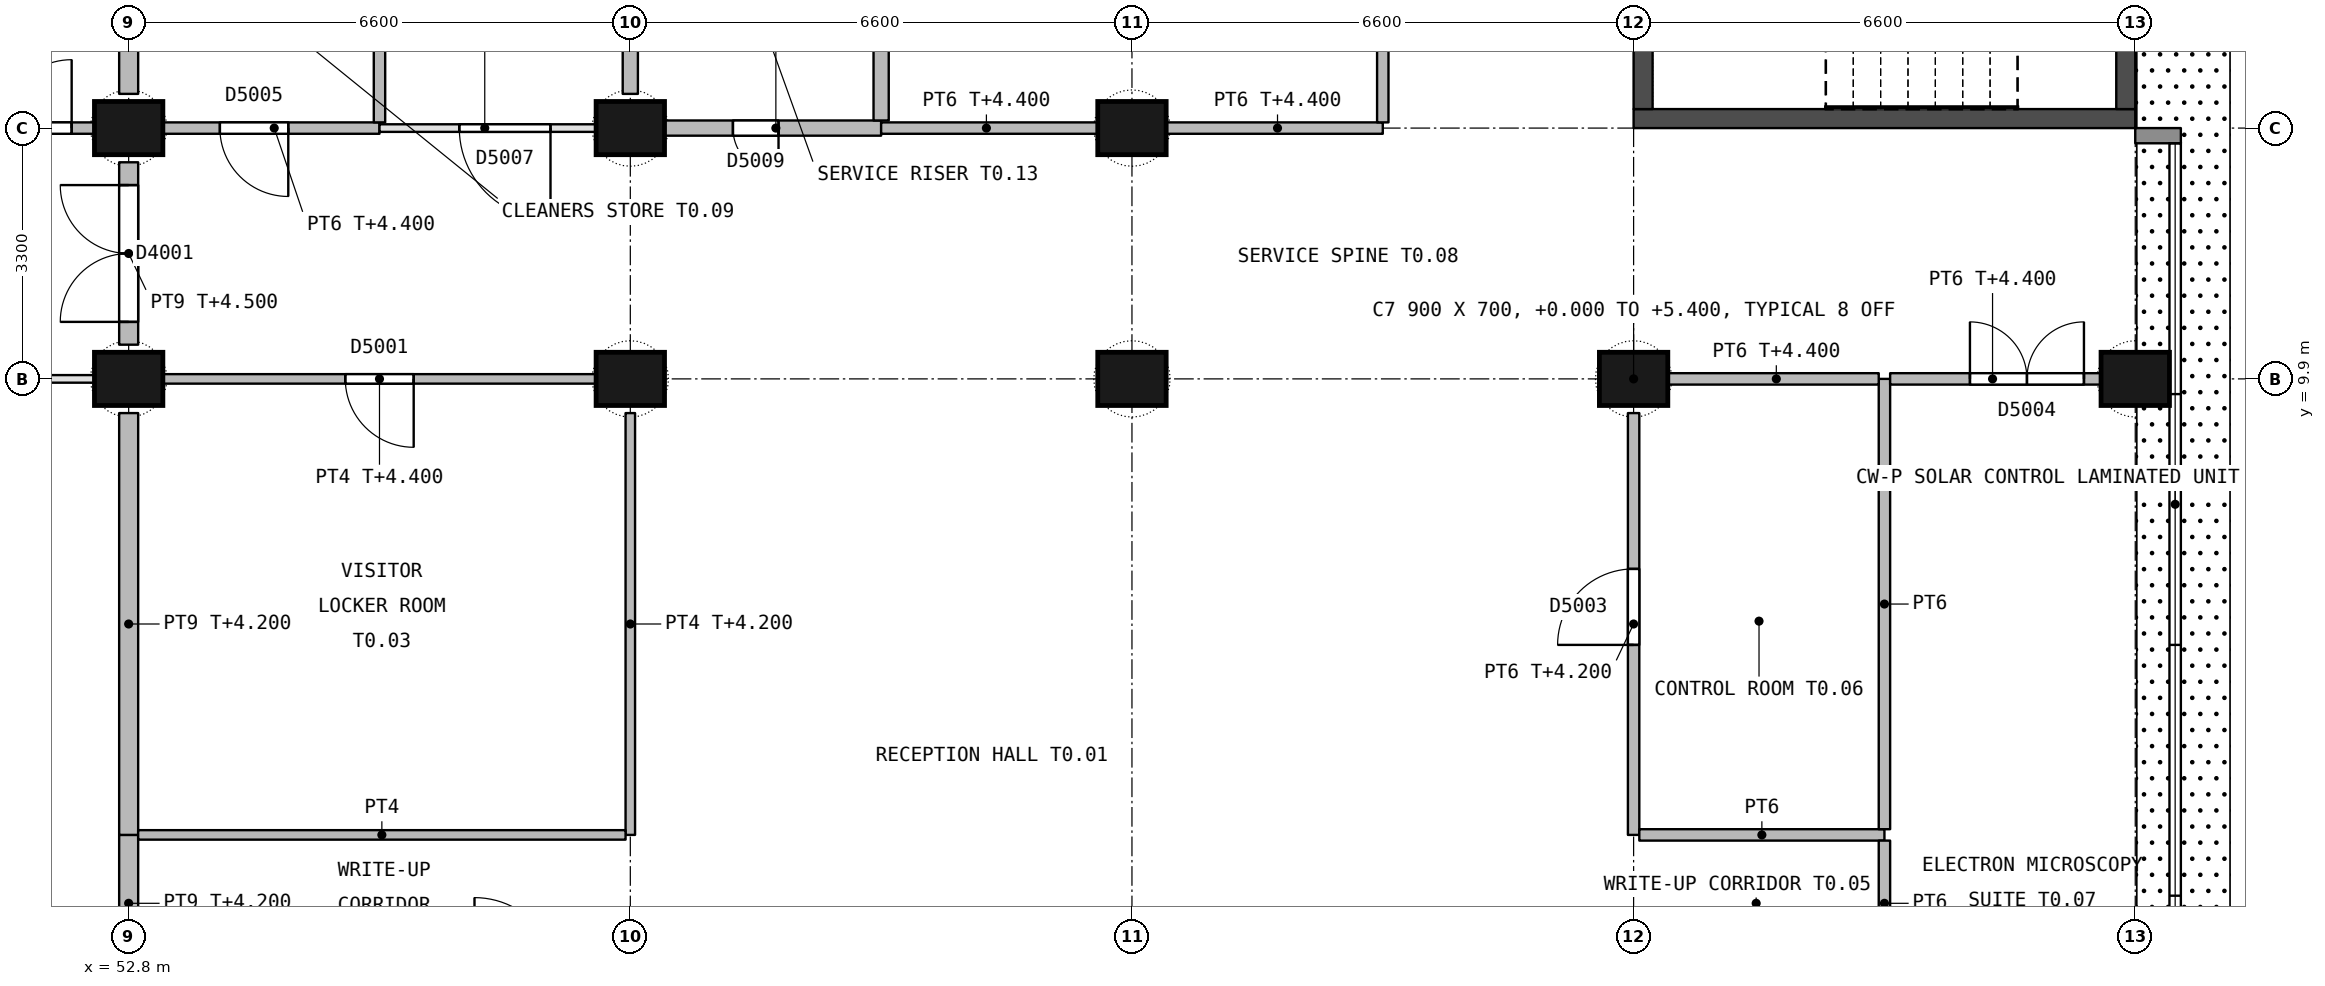
"""IFC4 building model, lengths in metres.
Left out: names, types, materials, properties, quantities, classifications, styles, units other than length and angle.
Written with IfcOpenShell. Run it as: python <this file> out.ifc"""

import sys

from ifc_helpers import new_model, si_unit, direction, frame, frame_2d, origin, origin_2d, place, context, subcontext, project, spatial, rectangle, extrude, element, fill, save


model = new_model("IFC4")
c1 = context("Model", 3, precision=1e-05, world=origin(), true_north=direction((0.0, 1.0)))
c2 = subcontext(c1, "Body", "Model", "MODEL_VIEW")
j1 = project(units=[si_unit("LENGTHUNIT", "METRE"), si_unit("PLANEANGLEUNIT", "RADIAN")], contexts=[c1])
p1 = place(None, origin())
s1 = spatial("IfcSite", under=j1, at=p1, CompositionType="ELEMENT")
p2 = place(p1, origin())
s2 = spatial("IfcBuilding", under=s1, at=p2, CompositionType="ELEMENT")
p3 = place(p2, origin())
s3 = spatial("IfcBuildingStorey", under=s2, at=p3, CompositionType="ELEMENT", Elevation=0.0)
for number, where, z_axis, x_axis in (
    (1, (52.8, 9.9, 0.0), (0.0, 0.0, 1.0), (1.0, 0.0, 0.0)),
    (2, (52.8, 13.2, 0.0), (0.0, 0.0, 1.0), (1.0, 0.0, 0.0)),
    (3, (59.4, 9.9, 0.0), (0.0, 0.0, 1.0), (1.0, 0.0, 0.0)),
    (4, (59.4, 13.2, 0.0), (0.0, 0.0, 1.0), (1.0, 0.0, 0.0)),
    (5, (66.0, 9.9, 0.0), (0.0, 0.0, 1.0), (1.0, 0.0, 0.0)),
    (6, (66.0, 13.2, 0.0), (0.0, 0.0, 1.0), (1.0, 0.0, 0.0)),
    (7, (72.6, 9.9, 0.0), (0.0, 0.0, 1.0), (1.0, 0.0, 0.0)),
    (8, (79.2, 9.9, 0.0), (0.0, 0.0, 1.0), (1.0, 0.0, 0.0)),
):
    element("IfcColumn", number, at=place(p3, frame(where, z_axis=z_axis, x_axis=x_axis)), inside=s3, PredefinedType="COLUMN", context=c2, shape_type="SweptSolid", body=[
        extrude(rectangle(XDim=0.9, YDim=0.7, at=origin_2d()), origin(), (0.0, 0.0, 1.0), 5.4),
    ])
p4 = place(p3, frame((72.6, 13.325, 0.0), z_axis=(0.0, 0.0, 1.0), x_axis=(1.0, 0.0, 0.0)))
e9 = element("IfcWall", 9, at=p4, inside=s3, PredefinedType="SHEAR", context=c2, shape_type="SweptSolid", body=[
    extrude(rectangle(XDim=6.6, YDim=0.25, at=frame_2d((3.3, 0.0))), origin(), (0.0, 0.0, 1.0), 5.1),
])
p5 = place(p3, frame((72.725, 13.45, 0.0), z_axis=(0.0, 0.0, 1.0), x_axis=(0.0, 1.0, 0.0)))
e10 = element("IfcWall", 10, at=p5, inside=s3, PredefinedType="SHEAR", context=c2, shape_type="SweptSolid", body=[
    extrude(rectangle(XDim=9.4, YDim=0.25, at=frame_2d((4.7, 0.0))), origin(), (0.0, 0.0, 1.0), 5.1),
])
p6 = place(p5, frame((4.125, 0.0, 0.0)))
e11 = element("IfcOpeningElement", 11, at=p6, cuts=e10, PredefinedType="OPENING", context=c2, shape_type="SweptSolid", body=[
    extrude(rectangle(XDim=1.2, YDim=2.1, at=frame_2d((0.6, 1.05))), frame((0.0, 0.135, 0.0), z_axis=(0.0, -1.0, 0.0), x_axis=(1.0, 0.0, 0.0)), (0.0, 0.0, 1.0), 0.27),
])
p7 = place(p3, frame((79.075, 13.45, 0.0), z_axis=(0.0, 0.0, 1.0), x_axis=(0.0, 1.0, 0.0)))
e12 = element("IfcWall", 12, at=p7, inside=s3, PredefinedType="SHEAR", context=c2, shape_type="SweptSolid", body=[
    extrude(rectangle(XDim=9.4, YDim=0.25, at=frame_2d((4.7, 0.0))), origin(), (0.0, 0.0, 1.0), 5.1),
])
p8 = place(p7, frame((4.125, 0.0, 0.0)))
e13 = element("IfcOpeningElement", 13, at=p8, cuts=e12, PredefinedType="OPENING", context=c2, shape_type="SweptSolid", body=[
    extrude(rectangle(XDim=1.2, YDim=2.4, at=frame_2d((0.6, 1.2))), frame((0.0, 0.135, 0.0), z_axis=(0.0, -1.0, 0.0), x_axis=(1.0, 0.0, 0.0)), (0.0, 0.0, 1.0), 0.27),
])
p9 = place(p7, frame((0.825, 0.0, 0.0)))
e14 = element("IfcOpeningElement", 14, at=p9, cuts=e12, PredefinedType="OPENING", context=c2, shape_type="SweptSolid", body=[
    extrude(rectangle(XDim=1.1, YDim=2.4, at=frame_2d((0.55, 1.2))), frame((0.0, 0.135, 0.0), z_axis=(0.0, -1.0, 0.0), x_axis=(1.0, 0.0, 0.0)), (0.0, 0.0, 1.0), 0.27),
])
p10 = place(p3, frame((79.2, 13.1, 0.0), z_axis=(0.0, 0.0, 1.0), x_axis=(1.0, 0.0, 0.0)))
e15 = element("IfcWall", 15, at=p10, inside=s3, PredefinedType="STANDARD", context=c2, shape_type="SweptSolid", body=[
    extrude(rectangle(XDim=0.6, YDim=0.2, at=frame_2d((0.3, 0.0))), origin(), (0.0, 0.0, 1.0), 4.4),
])
p11 = place(p3, frame((49.5, 13.2, 0.0), z_axis=(0.0, 0.0, 1.0), x_axis=(1.0, 0.0, 0.0)))
e16 = element("IfcWall", 16, at=p11, inside=s3, PredefinedType="PARTITIONING", context=c2, shape_type="SweptSolid", body=[
    extrude(rectangle(XDim=2.85, YDim=0.15, at=frame_2d((1.425, 0.0))), origin(), (0.0, 0.0, 1.0), 4.4),
])
p12 = place(p11, frame((0.75, 0.0, 0.0)))
e17 = element("IfcOpeningElement", 17, at=p12, cuts=e16, PredefinedType="OPENING", context=c2, shape_type="SweptSolid", body=[
    extrude(rectangle(XDim=1.8, YDim=2.4, at=frame_2d((0.9, 1.2))), frame((0.0, 0.085, 0.0), z_axis=(0.0, -1.0, 0.0), x_axis=(1.0, 0.0, 0.0)), (0.0, 0.0, 1.0), 0.17),
])
p13 = place(p3, frame((46.6, 9.9, 0.0), z_axis=(0.0, 0.0, 1.0), x_axis=(1.0, 0.0, 0.0)))
e18 = element("IfcWall", 18, at=p13, inside=s3, PredefinedType="PARTITIONING", context=c2, shape_type="SweptSolid", body=[
    extrude(rectangle(XDim=5.75, YDim=0.1, at=frame_2d((2.875, 0.0))), origin(), (0.0, 0.0, 1.0), 4.4),
])
p14 = place(p13, frame((0.5, 0.0, 0.0)))
e19 = element("IfcOpeningElement", 19, at=p14, cuts=e18, PredefinedType="OPENING", context=c2, shape_type="SweptSolid", body=[
    extrude(rectangle(XDim=1.5, YDim=2.4, at=frame_2d((0.75, 1.2))), frame((0.0, 0.06, 0.0), z_axis=(0.0, -1.0, 0.0), x_axis=(1.0, 0.0, 0.0)), (0.0, 0.0, 1.0), 0.12),
])
p15 = place(p3, frame((52.8, 10.35, 0.0), z_axis=(0.0, 0.0, 1.0), x_axis=(0.0, 1.0, 0.0)))
e20 = element("IfcWall", 20, at=p15, inside=s3, PredefinedType="PARTITIONING", context=c2, shape_type="SweptSolid", body=[
    extrude(rectangle(XDim=2.4, YDim=0.25, at=frame_2d((1.2, 0.0))), origin(), (0.0, 0.0, 1.0), 4.5),
])
p16 = place(p15, frame((0.3, 0.0, 0.0)))
e21 = element("IfcOpeningElement", 21, at=p16, cuts=e20, PredefinedType="OPENING", context=c2, shape_type="SweptSolid", body=[
    extrude(rectangle(XDim=1.8, YDim=2.1, at=frame_2d((0.9, 1.05))), frame((0.0, 0.135, 0.0), z_axis=(0.0, -1.0, 0.0), x_axis=(1.0, 0.0, 0.0)), (0.0, 0.0, 1.0), 0.27),
])
p17 = place(p3, frame((52.8, 13.65, 0.0), z_axis=(0.0, 0.0, 1.0), x_axis=(0.0, 1.0, 0.0)))
e22 = element("IfcWall", 22, at=p17, inside=s3, PredefinedType="PARTITIONING", context=c2, shape_type="SweptSolid", body=[
    extrude(rectangle(XDim=2.85, YDim=0.25, at=frame_2d((1.425, 0.0))), origin(), (0.0, 0.0, 1.0), 4.2),
])
p18 = place(p3, frame((52.8, 2.1, 0.0), z_axis=(0.0, 0.0, 1.0), x_axis=(0.0, 1.0, 0.0)))
e23 = element("IfcWall", 23, at=p18, inside=s3, PredefinedType="PARTITIONING", context=c2, shape_type="SweptSolid", body=[
    extrude(rectangle(XDim=1.8, YDim=0.25, at=frame_2d((0.9, 0.0))), origin(), (0.0, 0.0, 1.0), 4.2),
])
p19 = place(p3, frame((52.8, 3.9, 0.0), z_axis=(0.0, 0.0, 1.0), x_axis=(0.0, 1.0, 0.0)))
e24 = element("IfcWall", 24, at=p19, inside=s3, PredefinedType="PARTITIONING", context=c2, shape_type="SweptSolid", body=[
    extrude(rectangle(XDim=5.55, YDim=0.25, at=frame_2d((2.775, 0.0))), origin(), (0.0, 0.0, 1.0), 4.2),
])
p20 = place(p3, frame((59.4, 9.45, 0.0), z_axis=(0.0, 0.0, 1.0), x_axis=(0.0, -1.0, 0.0)))
e25 = element("IfcWall", 25, at=p20, inside=s3, PredefinedType="PARTITIONING", context=c2, shape_type="SweptSolid", body=[
    extrude(rectangle(XDim=5.55, YDim=0.125, at=frame_2d((2.775, 0.0))), origin(), (0.0, 0.0, 1.0), 4.2),
])
p21 = place(p3, frame((72.6, 9.45, 0.0), z_axis=(0.0, 0.0, 1.0), x_axis=(0.0, -1.0, 0.0)))
e26 = element("IfcWall", 26, at=p21, inside=s3, PredefinedType="PARTITIONING", context=c2, shape_type="SweptSolid", body=[
    extrude(rectangle(XDim=5.55, YDim=0.15, at=frame_2d((2.775, 0.0))), origin(), (0.0, 0.0, 1.0), 4.2),
])
p22 = place(p21, frame((2.05, 0.0, 0.0)))
e27 = element("IfcOpeningElement", 27, at=p22, cuts=e26, PredefinedType="OPENING", context=c2, shape_type="SweptSolid", body=[
    extrude(rectangle(XDim=1.0, YDim=2.1, at=frame_2d((0.5, 1.05))), frame((0.0, 0.085, 0.0), z_axis=(0.0, -1.0, 0.0), x_axis=(1.0, 0.0, 0.0)), (0.0, 0.0, 1.0), 0.17),
])
p23 = place(p3, frame((59.337, 3.9, 0.0), z_axis=(0.0, 0.0, 1.0), x_axis=(-1.0, 0.0, 0.0)))
e28 = element("IfcWall", 28, at=p23, inside=s3, PredefinedType="PARTITIONING", context=c2, shape_type="SweptSolid", body=[
    extrude(rectangle(XDim=6.412, YDim=0.125, at=frame_2d((3.206, 0.0))), origin(), (0.0, 0.0, 1.0), 5.1),
])
p24 = place(p3, frame((58.95, 9.9, 0.0), z_axis=(0.0, 0.0, 1.0), x_axis=(-1.0, 0.0, 0.0)))
e29 = element("IfcWall", 29, at=p24, inside=s3, PredefinedType="PARTITIONING", context=c2, shape_type="SweptSolid", body=[
    extrude(rectangle(XDim=5.7, YDim=0.125, at=frame_2d((2.85, 0.0))), origin(), (0.0, 0.0, 1.0), 4.4),
])
p25 = place(p24, frame((2.4, 0.0, 0.0)))
e30 = element("IfcOpeningElement", 30, at=p25, cuts=e29, PredefinedType="OPENING", context=c2, shape_type="SweptSolid", body=[
    extrude(rectangle(XDim=0.9, YDim=2.1, at=frame_2d((0.45, 1.05))), frame((0.0, 0.073, 0.0), z_axis=(0.0, -1.0, 0.0), x_axis=(1.0, 0.0, 0.0)), (0.0, 0.0, 1.0), 0.145),
])
p26 = place(p3, frame((75.9, 3.9, 0.0), z_axis=(0.0, 0.0, 1.0), x_axis=(-1.0, 0.0, 0.0)))
e31 = element("IfcWall", 31, at=p26, inside=s3, PredefinedType="PARTITIONING", context=c2, shape_type="SweptSolid", body=[
    extrude(rectangle(XDim=3.225, YDim=0.15, at=frame_2d((1.612, 0.0))), origin(), (0.0, 0.0, 1.0), 5.1),
])
p27 = place(p3, frame((75.9, 2.175, 0.0), z_axis=(0.0, 0.0, 1.0), x_axis=(0.0, 1.0, 0.0)))
e32 = element("IfcWall", 32, at=p27, inside=s3, PredefinedType="PARTITIONING", context=c2, shape_type="SweptSolid", body=[
    extrude(rectangle(XDim=1.65, YDim=0.15, at=frame_2d((0.825, 0.0))), origin(), (0.0, 0.0, 1.0), 5.1),
])
p28 = place(p3, frame((75.9, 3.975, 0.0), z_axis=(0.0, 0.0, 1.0), x_axis=(0.0, 1.0, 0.0)))
e33 = element("IfcWall", 33, at=p28, inside=s3, PredefinedType="PARTITIONING", context=c2, shape_type="SweptSolid", body=[
    extrude(rectangle(XDim=5.925, YDim=0.15, at=frame_2d((2.962, 0.0))), origin(), (0.0, 0.0, 1.0), 5.1),
])
p29 = place(p3, frame((75.825, 9.9, 0.0), z_axis=(0.0, 0.0, 1.0), x_axis=(-1.0, 0.0, 0.0)))
e34 = element("IfcWall", 34, at=p29, inside=s3, PredefinedType="PARTITIONING", context=c2, shape_type="SweptSolid", body=[
    extrude(rectangle(XDim=2.775, YDim=0.15, at=frame_2d((1.387, 0.0))), origin(), (0.0, 0.0, 1.0), 4.4),
])
p30 = place(p3, frame((75.975, 9.9, 0.0), z_axis=(0.0, 0.0, 1.0), x_axis=(1.0, 0.0, 0.0)))
e35 = element("IfcWall", 35, at=p30, inside=s3, PredefinedType="PARTITIONING", context=c2, shape_type="SweptSolid", body=[
    extrude(rectangle(XDim=2.775, YDim=0.15, at=frame_2d((1.387, 0.0))), origin(), (0.0, 0.0, 1.0), 4.4),
])
p31 = place(p30, frame((1.05, 0.0, 0.0)))
e36 = element("IfcOpeningElement", 36, at=p31, cuts=e35, PredefinedType="OPENING", context=c2, shape_type="SweptSolid", body=[
    extrude(rectangle(XDim=1.5, YDim=2.4, at=frame_2d((0.75, 1.2))), frame((0.0, 0.085, 0.0), z_axis=(0.0, -1.0, 0.0), x_axis=(1.0, 0.0, 0.0)), (0.0, 0.0, 1.0), 0.17),
])
p32 = place(p3, frame((56.1, 13.2, 0.0), z_axis=(0.0, 0.0, 1.0), x_axis=(-1.0, 0.0, 0.0)))
e37 = element("IfcWall", 37, at=p32, inside=s3, PredefinedType="PARTITIONING", context=c2, shape_type="SweptSolid", body=[
    extrude(rectangle(XDim=2.85, YDim=0.15, at=frame_2d((1.425, 0.0))), origin(), (0.0, 0.0, 1.0), 4.4),
])
p33 = place(p32, frame((1.2, 0.0, 0.0)))
e38 = element("IfcOpeningElement", 38, at=p33, cuts=e37, PredefinedType="OPENING", context=c2, shape_type="SweptSolid", body=[
    extrude(rectangle(XDim=0.9, YDim=2.1, at=frame_2d((0.45, 1.05))), frame((0.0, 0.085, 0.0), z_axis=(0.0, -1.0, 0.0), x_axis=(1.0, 0.0, 0.0)), (0.0, 0.0, 1.0), 0.17),
])
p34 = place(p3, frame((56.1, 13.2, 0.0), z_axis=(0.0, 0.0, 1.0), x_axis=(1.0, 0.0, 0.0)))
e39 = element("IfcWall", 39, at=p34, inside=s3, PredefinedType="PARTITIONING", context=c2, shape_type="SweptSolid", body=[
    extrude(rectangle(XDim=2.85, YDim=0.1, at=frame_2d((1.425, 0.0))), origin(), (0.0, 0.0, 1.0), 4.4),
])
p35 = place(p34, frame((1.05, 0.0, 0.0)))
e40 = element("IfcOpeningElement", 40, at=p35, cuts=e39, PredefinedType="OPENING", context=c2, shape_type="SweptSolid", body=[
    extrude(rectangle(XDim=1.2, YDim=2.1, at=frame_2d((0.6, 1.05))), frame((0.0, 0.06, 0.0), z_axis=(0.0, -1.0, 0.0), x_axis=(1.0, 0.0, 0.0)), (0.0, 0.0, 1.0), 0.12),
])
p36 = place(p3, frame((59.85, 13.2, 0.0), z_axis=(0.0, 0.0, 1.0), x_axis=(1.0, 0.0, 0.0)))
e41 = element("IfcWall", 41, at=p36, inside=s3, PredefinedType="PARTITIONING", context=c2, shape_type="SweptSolid", body=[
    extrude(rectangle(XDim=2.85, YDim=0.2, at=frame_2d((1.425, 0.0))), origin(), (0.0, 0.0, 1.0), 4.4),
])
p37 = place(p36, frame((0.9, 0.0, 0.0)))
e42 = element("IfcOpeningElement", 42, at=p37, cuts=e41, PredefinedType="OPENING", context=c2, shape_type="SweptSolid", body=[
    extrude(rectangle(XDim=0.6, YDim=2.1, at=frame_2d((0.3, 1.05))), frame((0.0, 0.11, 0.0), z_axis=(0.0, -1.0, 0.0), x_axis=(1.0, 0.0, 0.0)), (0.0, 0.0, 1.0), 0.22),
])
for number, where, z_axis, x_axis in (
    (43, (69.3, 13.2, 0.0), (0.0, 0.0, 1.0), (-1.0, 0.0, 0.0)),
    (44, (65.55, 13.2, 0.0), (0.0, 0.0, 1.0), (-1.0, 0.0, 0.0)),
):
    element("IfcWall", number, at=place(p3, frame(where, z_axis=z_axis, x_axis=x_axis)), inside=s3, PredefinedType="PARTITIONING", context=c2, shape_type="SweptSolid", body=[
        extrude(rectangle(XDim=2.85, YDim=0.15, at=frame_2d((1.425, 0.0))), origin(), (0.0, 0.0, 1.0), 4.4),
    ])
p38 = place(p3, frame((56.1, 13.275, 0.0), z_axis=(0.0, 0.0, 1.0), x_axis=(0.0, 1.0, 0.0)))
e45 = element("IfcWall", 45, at=p38, inside=s3, PredefinedType="PARTITIONING", context=c2, shape_type="SweptSolid", body=[
    extrude(rectangle(XDim=3.15, YDim=0.15, at=frame_2d((1.575, 0.0))), origin(), (0.0, 0.0, 1.0), 5.1),
])
p39 = place(p3, frame((59.4, 13.65, 0.0), z_axis=(0.0, 0.0, 1.0), x_axis=(0.0, 1.0, 0.0)))
e46 = element("IfcWall", 46, at=p39, inside=s3, PredefinedType="PARTITIONING", context=c2, shape_type="SweptSolid", body=[
    extrude(rectangle(XDim=2.85, YDim=0.2, at=frame_2d((1.425, 0.0))), origin(), (0.0, 0.0, 1.0), 4.2),
])
p40 = place(p3, frame((62.7, 13.3, 0.0), z_axis=(0.0, 0.0, 1.0), x_axis=(0.0, 1.0, 0.0)))
e47 = element("IfcWall", 47, at=p40, inside=s3, PredefinedType="PARTITIONING", context=c2, shape_type="SweptSolid", body=[
    extrude(rectangle(XDim=3.1, YDim=0.2, at=frame_2d((1.55, 0.0))), origin(), (0.0, 0.0, 1.0), 5.1),
])
p41 = place(p3, frame((69.3, 23.1, 0.0), z_axis=(0.0, 0.0, 1.0), x_axis=(0.0, -1.0, 0.0)))
e48 = element("IfcWall", 48, at=p41, inside=s3, PredefinedType="PARTITIONING", context=c2, shape_type="SweptSolid", body=[
    extrude(rectangle(XDim=9.825, YDim=0.15, at=frame_2d((4.913, 0.0))), origin(), (0.0, 0.0, 1.0), 5.1),
])
p42 = place(p41, frame((4.2, 0.0, 0.0)))
e49 = element("IfcOpeningElement", 49, at=p42, cuts=e48, PredefinedType="OPENING", context=c2, shape_type="SweptSolid", body=[
    extrude(rectangle(XDim=1.5, YDim=2.4, at=frame_2d((0.75, 1.2))), frame((0.0, 0.085, 0.0), z_axis=(0.0, -1.0, 0.0), x_axis=(1.0, 0.0, 0.0)), (0.0, 0.0, 1.0), 0.17),
])
p43 = place(p16, origin())
e50 = element("IfcDoor", 50, at=p43, inside=s3, OperationType="DOUBLE_DOOR_SINGLE_SWING", PredefinedType="DOOR", context=c2, shape_type="SweptSolid", body=[
    extrude(rectangle(XDim=1.8, YDim=2.1, at=frame_2d((0.9, 1.05))), frame((0.0, 0.03, 0.0), z_axis=(0.0, -1.0, 0.0), x_axis=(1.0, 0.0, 0.0)), (0.0, 0.0, 1.0), 0.06),
])
fill(e21, e50)
p44 = place(p12, origin())
e51 = element("IfcDoor", 51, at=p44, inside=s3, OperationType="DOUBLE_DOOR_SINGLE_SWING", PredefinedType="DOOR", context=c2, shape_type="SweptSolid", body=[
    extrude(rectangle(XDim=1.8, YDim=2.4, at=frame_2d((0.9, 1.2))), frame((0.0, 0.027, 0.0), z_axis=(0.0, -1.0, 0.0), x_axis=(1.0, 0.0, 0.0)), (0.0, 0.0, 1.0), 0.054),
])
fill(e17, e51)
p45 = place(p25, origin())
e52 = element("IfcDoor", 52, at=p45, inside=s3, OperationType="SINGLE_SWING_LEFT", PredefinedType="DOOR", context=c2, shape_type="SweptSolid", body=[
    extrude(rectangle(XDim=0.9, YDim=2.1, at=frame_2d((0.45, 1.05))), frame((0.0, 0.027, 0.0), z_axis=(0.0, -1.0, 0.0), x_axis=(1.0, 0.0, 0.0)), (0.0, 0.0, 1.0), 0.054),
])
fill(e30, e52)
p46 = place(p22, origin())
e53 = element("IfcDoor", 53, at=p46, inside=s3, OperationType="SINGLE_SWING_RIGHT", PredefinedType="DOOR", context=c2, shape_type="SweptSolid", body=[
    extrude(rectangle(XDim=1.0, YDim=2.1, at=frame_2d((0.5, 1.05))), frame((0.0, 0.027, 0.0), z_axis=(0.0, -1.0, 0.0), x_axis=(1.0, 0.0, 0.0)), (0.0, 0.0, 1.0), 0.054),
])
fill(e27, e53)
p47 = place(p31, origin())
e54 = element("IfcDoor", 54, at=p47, inside=s3, OperationType="DOUBLE_DOOR_SINGLE_SWING", PredefinedType="DOOR", context=c2, shape_type="SweptSolid", body=[
    extrude(rectangle(XDim=1.5, YDim=2.4, at=frame_2d((0.75, 1.2))), frame((0.0, 0.027, 0.0), z_axis=(0.0, -1.0, 0.0), x_axis=(1.0, 0.0, 0.0)), (0.0, 0.0, 1.0), 0.054),
])
fill(e36, e54)
p48 = place(p33, origin())
e55 = element("IfcDoor", 55, at=p48, inside=s3, OperationType="SINGLE_SWING_LEFT", PredefinedType="DOOR", context=c2, shape_type="SweptSolid", body=[
    extrude(rectangle(XDim=0.9, YDim=2.1, at=frame_2d((0.45, 1.05))), frame((0.0, 0.027, 0.0), z_axis=(0.0, -1.0, 0.0), x_axis=(1.0, 0.0, 0.0)), (0.0, 0.0, 1.0), 0.054),
])
fill(e38, e55)
p49 = place(p35, origin())
e56 = element("IfcDoor", 56, at=p49, inside=s3, OperationType="SINGLE_SWING_RIGHT", PredefinedType="DOOR", context=c2, shape_type="SweptSolid", body=[
    extrude(rectangle(XDim=1.2, YDim=2.1, at=frame_2d((0.6, 1.05))), frame((0.0, 0.022, 0.0), z_axis=(0.0, -1.0, 0.0), x_axis=(1.0, 0.0, 0.0)), (0.0, 0.0, 1.0), 0.044),
])
fill(e40, e56)
p50 = place(p37, origin())
e57 = element("IfcDoor", 57, at=p50, inside=s3, OperationType="SINGLE_SWING_RIGHT", PredefinedType="DOOR", context=c2, shape_type="SweptSolid", body=[
    extrude(rectangle(XDim=0.6, YDim=2.1, at=frame_2d((0.3, 1.05))), frame((0.0, 0.03, 0.0), z_axis=(0.0, -1.0, 0.0), x_axis=(1.0, 0.0, 0.0)), (0.0, 0.0, 1.0), 0.06),
])
fill(e42, e57)
save(model, sys.argv[1])
